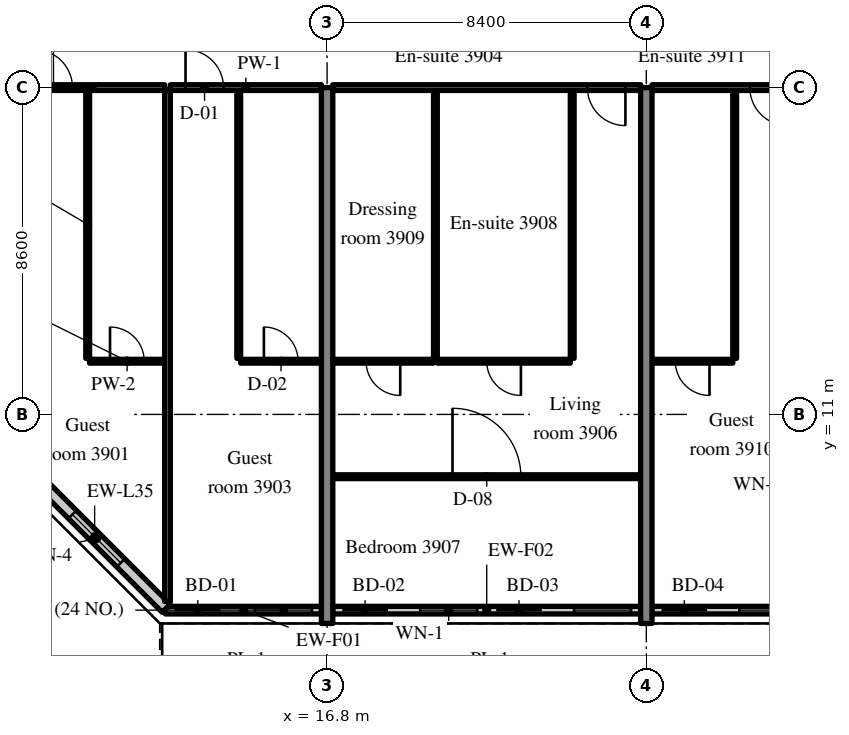
"""IFC4 building model, lengths in metres.
Left out: names, types, materials, properties, quantities, classifications, styles, units other than length and angle.
Written with IfcOpenShell. Run it as: python <this file> out.ifc"""

import sys

from ifc_helpers import new_model, si_unit, direction, frame, frame_2d, origin, place, context, subcontext, project, spatial, rectangle, extrude, source, transform, mapped, element, fill, save


model = new_model("IFC4")
c1 = context("Model", 3, precision=1e-05, world=origin(), true_north=direction((0.0, 1.0)))
c2 = subcontext(c1, "Body", "Model", "MODEL_VIEW")
j1 = project(units=[si_unit("LENGTHUNIT", "METRE"), si_unit("PLANEANGLEUNIT", "RADIAN")], contexts=[c1])
p1 = place(None, origin())
s1 = spatial("IfcSite", under=j1, at=p1, CompositionType="ELEMENT")
p2 = place(p1, origin())
s2 = spatial("IfcBuilding", under=s1, at=p2, CompositionType="ELEMENT")
p3 = place(p2, frame((0.0, 0.0, 163.0)))
s3 = spatial("IfcBuildingStorey", under=s2, at=p3, CompositionType="ELEMENT", Elevation=163.0)
m1 = source(origin(), c2, "Body", "SweptSolid", [
    extrude(rectangle(XDim=14.1, YDim=0.3, at=frame_2d((7.05, 0.0))), origin(), (0.0, 0.0, 1.0), 3.52),
])
for number, where, z_axis, x_axis in (
    (1, (16.8, 5.5, 0.0), (0.0, 0.0, 1.0), (0.0, 1.0, 0.0)),
    (2, (25.2, 5.5, 0.0), (0.0, 0.0, 1.0), (0.0, 1.0, 0.0)),
):
    element("IfcWall", number, at=place(p3, frame(where, z_axis=z_axis, x_axis=x_axis)), inside=s3, PredefinedType="SHEAR", context=c2, shape_type="MappedRepresentation", body=[
        mapped(m1, transform((0.0, 0.0, 0.0), scale=1.0)),
    ])
m2 = source(origin(), c2, "Body", "SweptSolid", [
    extrude(rectangle(XDim=4.105, YDim=0.2, at=frame_2d((2.052, 0.0))), origin(), (0.0, 0.0, 1.0), 2.87),
])
p4 = place(p3, frame((12.545, 5.85, 0.0), z_axis=(0.0, 0.0, 1.0), x_axis=(1.0, 0.0, 0.0)))
e3 = element("IfcWall", 3, at=p4, inside=s3, PredefinedType="SOLIDWALL", context=c2, shape_type="MappedRepresentation", body=[
    mapped(m2, transform((0.0, 0.0, 0.0), scale=1.0)),
])
m3 = source(origin(), c2, "Body", "SweptSolid", [
    extrude(rectangle(XDim=1.2, YDim=2.4, at=frame_2d((0.6, 1.2))), frame((0.0, 0.11, 0.0), z_axis=(0.0, -1.0, 0.0), x_axis=(1.0, 0.0, 0.0)), (0.0, 0.0, 1.0), 0.22),
])
p5 = place(p4, frame((0.25, 0.0, 0.0)))
e4 = element("IfcOpeningElement", 4, at=p5, cuts=e3, PredefinedType="OPENING", context=c2, shape_type="MappedRepresentation", body=[
    mapped(m3, transform((0.0, 0.0, 0.0), scale=1.0)),
])
m4 = source(origin(), c2, "Body", "SweptSolid", [
    extrude(rectangle(XDim=1.5, YDim=1.5, at=frame_2d((0.75, 0.75))), frame((0.0, 0.11, 0.0), z_axis=(0.0, -1.0, 0.0), x_axis=(1.0, 0.0, 0.0)), (0.0, 0.0, 1.0), 0.22),
])
p6 = place(p4, frame((2.355, 0.0, 0.9)))
e5 = element("IfcOpeningElement", 5, at=p6, cuts=e3, PredefinedType="OPENING", context=c2, shape_type="MappedRepresentation", body=[
    mapped(m4, transform((0.0, 0.0, 0.0), scale=1.0)),
])
m5 = source(origin(), c2, "Body", "SweptSolid", [
    extrude(rectangle(XDim=8.1, YDim=0.2, at=frame_2d((4.05, 0.0))), origin(), (0.0, 0.0, 1.0), 2.87),
])
p7 = place(p3, frame((16.95, 5.85, 0.0), z_axis=(0.0, 0.0, 1.0), x_axis=(1.0, 0.0, 0.0)))
e6 = element("IfcWall", 6, at=p7, inside=s3, PredefinedType="SOLIDWALL", context=c2, shape_type="MappedRepresentation", body=[
    mapped(m5, transform((0.0, 0.0, 0.0), scale=1.0)),
])
p8 = place(p7, frame((0.25, 0.0, 0.0)))
e7 = element("IfcOpeningElement", 7, at=p8, cuts=e6, PredefinedType="OPENING", context=c2, shape_type="MappedRepresentation", body=[
    mapped(m3, transform((0.0, 0.0, 0.0), scale=1.0)),
])
p9 = place(p7, frame((2.3, 0.0, 0.9)))
e8 = element("IfcOpeningElement", 8, at=p9, cuts=e6, PredefinedType="OPENING", context=c2, shape_type="MappedRepresentation", body=[
    mapped(m4, transform((0.0, 0.0, 0.0), scale=1.0)),
])
p10 = place(p7, frame((4.3, 0.0, 0.0)))
e9 = element("IfcOpeningElement", 9, at=p10, cuts=e6, PredefinedType="OPENING", context=c2, shape_type="MappedRepresentation", body=[
    mapped(m3, transform((0.0, 0.0, 0.0), scale=1.0)),
])
p11 = place(p7, frame((6.35, 0.0, 0.9)))
e10 = element("IfcOpeningElement", 10, at=p11, cuts=e6, PredefinedType="OPENING", context=c2, shape_type="MappedRepresentation", body=[
    mapped(m4, transform((0.0, 0.0, 0.0), scale=1.0)),
])
m6 = source(origin(), c2, "Body", "SweptSolid", [
    extrude(rectangle(XDim=8.1, YDim=0.2, at=frame_2d((4.05, 0.0))), origin(), (0.0, 0.0, 1.0), 2.87),
])
p12 = place(p3, frame((25.35, 5.85, 0.0), z_axis=(0.0, 0.0, 1.0), x_axis=(1.0, 0.0, 0.0)))
e11 = element("IfcWall", 11, at=p12, inside=s3, PredefinedType="SOLIDWALL", context=c2, shape_type="MappedRepresentation", body=[
    mapped(m6, transform((0.0, 0.0, 0.0), scale=1.0)),
])
p13 = place(p12, frame((0.25, 0.0, 0.0)))
e12 = element("IfcOpeningElement", 12, at=p13, cuts=e11, PredefinedType="OPENING", context=c2, shape_type="MappedRepresentation", body=[
    mapped(m3, transform((0.0, 0.0, 0.0), scale=1.0)),
])
p14 = place(p12, frame((2.3, 0.0, 0.9)))
e13 = element("IfcOpeningElement", 13, at=p14, cuts=e11, PredefinedType="OPENING", context=c2, shape_type="MappedRepresentation", body=[
    mapped(m4, transform((0.0, 0.0, 0.0), scale=1.0)),
])
p15 = place(p12, frame((4.3, 0.0, 0.0)))
e14 = element("IfcOpeningElement", 14, at=p15, cuts=e11, PredefinedType="OPENING", context=c2, shape_type="MappedRepresentation", body=[
    mapped(m3, transform((0.0, 0.0, 0.0), scale=1.0)),
])
p16 = place(p12, frame((6.35, 0.0, 0.9)))
e15 = element("IfcOpeningElement", 15, at=p16, cuts=e11, PredefinedType="OPENING", context=c2, shape_type="MappedRepresentation", body=[
    mapped(m4, transform((0.0, 0.0, 0.0), scale=1.0)),
])
m7 = source(origin(), c2, "Body", "SweptSolid", [
    extrude(rectangle(XDim=5.326, YDim=0.3, at=frame_2d((2.663, 0.0))), origin(), (0.0, 0.0, 1.0), 3.52),
])
p17 = place(p3, frame((8.8, 9.666, 0.0), z_axis=(0.0, 0.0, 1.0), x_axis=(0.707083859269, -0.707129702361, 0.0)))
e16 = element("IfcWall", 16, at=p17, inside=s3, PredefinedType="SOLIDWALL", context=c2, shape_type="MappedRepresentation", body=[
    mapped(m7, transform((0.0, 0.0, 0.0), scale=1.0)),
])
m8 = source(origin(), c2, "Body", "SweptSolid", [
    extrude(rectangle(XDim=1.8, YDim=1.5, at=frame_2d((0.9, 0.75))), frame((0.0, 0.16, 0.0), z_axis=(0.0, -1.0, 0.0), x_axis=(1.0, 0.0, 0.0)), (0.0, 0.0, 1.0), 0.32),
])
p18 = place(p17, frame((1.836, 0.0, 0.9)))
e17 = element("IfcOpeningElement", 17, at=p18, cuts=e16, PredefinedType="OPENING", context=c2, shape_type="MappedRepresentation", body=[
    mapped(m8, transform((0.0, 0.0, 0.0), scale=1.0)),
])
m9 = source(origin(), c2, "Body", "SweptSolid", [
    extrude(rectangle(XDim=7.05, YDim=0.1, at=frame_2d((3.525, 0.0))), origin(), (0.0, 0.0, 1.0), 3.52),
])
p19 = place(p3, frame((10.5, 12.475, 0.0), z_axis=(0.0, 0.0, 1.0), x_axis=(0.0, 1.0, 0.0)))
e18 = element("IfcWall", 18, at=p19, inside=s3, PredefinedType="PARTITIONING", context=c2, shape_type="MappedRepresentation", body=[
    mapped(m9, transform((0.0, 0.0, 0.0), scale=1.0)),
])
m10 = source(origin(), c2, "Body", "SweptSolid", [
    extrude(rectangle(XDim=1.975, YDim=0.1, at=frame_2d((0.987, 0.0))), origin(), (0.0, 0.0, 1.0), 3.52),
])
p20 = place(p3, frame((10.55, 12.4, 0.0), z_axis=(0.0, 0.0, 1.0), x_axis=(1.0, 0.0, 0.0)))
e19 = element("IfcWall", 19, at=p20, inside=s3, PredefinedType="PARTITIONING", context=c2, shape_type="MappedRepresentation", body=[
    mapped(m10, transform((0.0, 0.0, 0.0), scale=1.0)),
])
m11 = source(origin(), c2, "Body", "SweptSolid", [
    extrude(rectangle(XDim=0.9, YDim=2.1, at=frame_2d((0.45, 1.05))), frame((0.0, 0.06, 0.0), z_axis=(0.0, -1.0, 0.0), x_axis=(1.0, 0.0, 0.0)), (0.0, 0.0, 1.0), 0.12),
])
p21 = place(p20, frame((0.538, 0.0, 0.0)))
e20 = element("IfcOpeningElement", 20, at=p21, cuts=e19, PredefinedType="OPENING", context=c2, shape_type="MappedRepresentation", body=[
    mapped(m11, transform((0.0, 0.0, 0.0), scale=1.0)),
])
m12 = source(origin(), c2, "Body", "SweptSolid", [
    extrude(rectangle(XDim=3.825, YDim=0.15, at=frame_2d((1.913, 0.0))), origin(), (0.0, 0.0, 1.0), 2.82),
])
p22 = place(p3, frame((8.7, 19.6, 0.0), z_axis=(0.0, 0.0, 1.0), x_axis=(1.0, 0.0, 0.0)))
e21 = element("IfcWall", 21, at=p22, inside=s3, PredefinedType="PARTITIONING", context=c2, shape_type="MappedRepresentation", body=[
    mapped(m12, transform((0.0, 0.0, 0.0), scale=1.0)),
])
m13 = source(origin(), c2, "Body", "SweptSolid", [
    extrude(rectangle(XDim=1.0, YDim=2.1, at=frame_2d((0.5, 1.05))), frame((0.0, 0.085, 0.0), z_axis=(0.0, -1.0, 0.0), x_axis=(1.0, 0.0, 0.0)), (0.0, 0.0, 1.0), 0.17),
])
p23 = place(p22, frame((0.4, 0.0, 0.0)))
e22 = element("IfcOpeningElement", 22, at=p23, cuts=e21, PredefinedType="OPENING", context=c2, shape_type="MappedRepresentation", body=[
    mapped(m13, transform((0.0, 0.0, 0.0), scale=1.0)),
])
p24 = place(p3, frame((14.475, 12.475, 0.0), z_axis=(0.0, 0.0, 1.0), x_axis=(0.0, 1.0, 0.0)))
e23 = element("IfcWall", 23, at=p24, inside=s3, PredefinedType="PARTITIONING", context=c2, shape_type="MappedRepresentation", body=[
    mapped(m9, transform((0.0, 0.0, 0.0), scale=1.0)),
])
m14 = source(origin(), c2, "Body", "SweptSolid", [
    extrude(rectangle(XDim=2.125, YDim=0.1, at=frame_2d((1.062, 0.0))), origin(), (0.0, 0.0, 1.0), 3.52),
])
p25 = place(p3, frame((14.525, 12.4, 0.0), z_axis=(0.0, 0.0, 1.0), x_axis=(1.0, 0.0, 0.0)))
e24 = element("IfcWall", 24, at=p25, inside=s3, PredefinedType="PARTITIONING", context=c2, shape_type="MappedRepresentation", body=[
    mapped(m14, transform((0.0, 0.0, 0.0), scale=1.0)),
])
p26 = place(p25, frame((0.612, 0.0, 0.0)))
e25 = element("IfcOpeningElement", 25, at=p26, cuts=e24, PredefinedType="OPENING", context=c2, shape_type="MappedRepresentation", body=[
    mapped(m11, transform((0.0, 0.0, 0.0), scale=1.0)),
])
m15 = source(origin(), c2, "Body", "SweptSolid", [
    extrude(rectangle(XDim=3.975, YDim=0.15, at=frame_2d((1.987, 0.0))), origin(), (0.0, 0.0, 1.0), 2.82),
])
p27 = place(p3, frame((12.675, 19.6, 0.0), z_axis=(0.0, 0.0, 1.0), x_axis=(1.0, 0.0, 0.0)))
e26 = element("IfcWall", 26, at=p27, inside=s3, PredefinedType="PARTITIONING", context=c2, shape_type="MappedRepresentation", body=[
    mapped(m15, transform((0.0, 0.0, 0.0), scale=1.0)),
])
p28 = place(p27, frame((0.4, 0.0, 0.0)))
e27 = element("IfcOpeningElement", 27, at=p28, cuts=e26, PredefinedType="OPENING", context=c2, shape_type="MappedRepresentation", body=[
    mapped(m13, transform((0.0, 0.0, 0.0), scale=1.0)),
])
m16 = source(origin(), c2, "Body", "SweptSolid", [
    extrude(rectangle(XDim=13.447, YDim=0.15, at=frame_2d((6.724, 0.0))), origin(), (0.0, 0.0, 1.0), 3.52),
])
p29 = place(p3, frame((12.6, 6.078, 0.0), z_axis=(0.0, 0.0, 1.0), x_axis=(0.0, 1.0, 0.0)))
e28 = element("IfcWall", 28, at=p29, inside=s3, PredefinedType="PARTITIONING", context=c2, shape_type="MappedRepresentation", body=[
    mapped(m16, transform((0.0, 0.0, 0.0), scale=1.0)),
])
for number, where, z_axis, x_axis in (
    (29, (23.25, 12.475, 0.0), (0.0, 0.0, 1.0), (0.0, 1.0, 0.0)),
    (30, (19.65, 12.475, 0.0), (0.0, 0.0, 1.0), (0.0, 1.0, 0.0)),
):
    element("IfcWall", number, at=place(p3, frame(where, z_axis=z_axis, x_axis=x_axis)), inside=s3, PredefinedType="PARTITIONING", context=c2, shape_type="MappedRepresentation", body=[
        mapped(m9, transform((0.0, 0.0, 0.0), scale=1.0)),
    ])
m17 = source(origin(), c2, "Body", "SweptSolid", [
    extrude(rectangle(XDim=3.5, YDim=0.1, at=frame_2d((1.75, 0.0))), origin(), (0.0, 0.0, 1.0), 3.52),
])
p30 = place(p3, frame((19.7, 12.4, 0.0), z_axis=(0.0, 0.0, 1.0), x_axis=(1.0, 0.0, 0.0)))
e31 = element("IfcWall", 31, at=p30, inside=s3, PredefinedType="PARTITIONING", context=c2, shape_type="MappedRepresentation", body=[
    mapped(m17, transform((0.0, 0.0, 0.0), scale=1.0)),
])
p31 = place(p30, frame((1.3, 0.0, 0.0)))
e32 = element("IfcOpeningElement", 32, at=p31, cuts=e31, PredefinedType="OPENING", context=c2, shape_type="MappedRepresentation", body=[
    mapped(m11, transform((0.0, 0.0, 0.0), scale=1.0)),
])
m18 = source(origin(), c2, "Body", "SweptSolid", [
    extrude(rectangle(XDim=2.65, YDim=0.1, at=frame_2d((1.325, 0.0))), origin(), (0.0, 0.0, 1.0), 3.52),
])
p32 = place(p3, frame((16.95, 12.4, 0.0), z_axis=(0.0, 0.0, 1.0), x_axis=(1.0, 0.0, 0.0)))
e33 = element("IfcWall", 33, at=p32, inside=s3, PredefinedType="PARTITIONING", context=c2, shape_type="MappedRepresentation", body=[
    mapped(m18, transform((0.0, 0.0, 0.0), scale=1.0)),
])
p33 = place(p32, frame((0.875, 0.0, 0.0)))
e34 = element("IfcOpeningElement", 34, at=p33, cuts=e33, PredefinedType="OPENING", context=c2, shape_type="MappedRepresentation", body=[
    mapped(m11, transform((0.0, 0.0, 0.0), scale=1.0)),
])
m19 = source(origin(), c2, "Body", "SweptSolid", [
    extrude(rectangle(XDim=8.1, YDim=0.1, at=frame_2d((4.05, 0.0))), origin(), (0.0, 0.0, 1.0), 3.52),
])
p34 = place(p3, frame((16.95, 9.362, 0.0), z_axis=(0.0, 0.0, 1.0), x_axis=(1.0, 0.0, 0.0)))
e35 = element("IfcWall", 35, at=p34, inside=s3, PredefinedType="PARTITIONING", context=c2, shape_type="MappedRepresentation", body=[
    mapped(m19, transform((0.0, 0.0, 0.0), scale=1.0)),
])
m20 = source(origin(), c2, "Body", "SweptSolid", [
    extrude(rectangle(XDim=1.8, YDim=2.1, at=frame_2d((0.9, 1.05))), frame((0.0, 0.06, 0.0), z_axis=(0.0, -1.0, 0.0), x_axis=(1.0, 0.0, 0.0)), (0.0, 0.0, 1.0), 0.12),
])
p35 = place(p34, frame((3.15, 0.0, 0.0)))
e36 = element("IfcOpeningElement", 36, at=p35, cuts=e35, PredefinedType="OPENING", context=c2, shape_type="MappedRepresentation", body=[
    mapped(m20, transform((0.0, 0.0, 0.0), scale=1.0)),
])
m21 = source(origin(), c2, "Body", "SweptSolid", [
    extrude(rectangle(XDim=8.1, YDim=0.15, at=frame_2d((4.05, 0.0))), origin(), (0.0, 0.0, 1.0), 2.82),
])
p36 = place(p3, frame((16.95, 19.6, 0.0), z_axis=(0.0, 0.0, 1.0), x_axis=(1.0, 0.0, 0.0)))
e37 = element("IfcWall", 37, at=p36, inside=s3, PredefinedType="PARTITIONING", context=c2, shape_type="MappedRepresentation", body=[
    mapped(m21, transform((0.0, 0.0, 0.0), scale=1.0)),
])
p37 = place(p36, frame((6.7, 0.0, 0.0)))
e38 = element("IfcOpeningElement", 38, at=p37, cuts=e37, PredefinedType="OPENING", context=c2, shape_type="MappedRepresentation", body=[
    mapped(m13, transform((0.0, 0.0, 0.0), scale=1.0)),
])
p38 = place(p3, frame((27.525, 12.475, 0.0), z_axis=(0.0, 0.0, 1.0), x_axis=(0.0, 1.0, 0.0)))
e39 = element("IfcWall", 39, at=p38, inside=s3, PredefinedType="PARTITIONING", context=c2, shape_type="MappedRepresentation", body=[
    mapped(m9, transform((0.0, 0.0, 0.0), scale=1.0)),
])
p39 = place(p3, frame((25.35, 12.4, 0.0), z_axis=(0.0, 0.0, 1.0), x_axis=(1.0, 0.0, 0.0)))
e40 = element("IfcWall", 40, at=p39, inside=s3, PredefinedType="PARTITIONING", context=c2, shape_type="MappedRepresentation", body=[
    mapped(m14, transform((0.0, 0.0, 0.0), scale=1.0)),
])
p40 = place(p39, frame((0.613, 0.0, 0.0)))
e41 = element("IfcOpeningElement", 41, at=p40, cuts=e40, PredefinedType="OPENING", context=c2, shape_type="MappedRepresentation", body=[
    mapped(m11, transform((0.0, 0.0, 0.0), scale=1.0)),
])
p41 = place(p3, frame((25.35, 19.6, 0.0), z_axis=(0.0, 0.0, 1.0), x_axis=(1.0, 0.0, 0.0)))
e42 = element("IfcWall", 42, at=p41, inside=s3, PredefinedType="PARTITIONING", context=c2, shape_type="MappedRepresentation", body=[
    mapped(m15, transform((0.0, 0.0, 0.0), scale=1.0)),
])
p42 = place(p41, frame((2.575, 0.0, 0.0)))
e43 = element("IfcOpeningElement", 43, at=p42, cuts=e42, PredefinedType="OPENING", context=c2, shape_type="MappedRepresentation", body=[
    mapped(m13, transform((0.0, 0.0, 0.0), scale=1.0)),
])
m22 = source(origin(), c2, "Body", "SweptSolid", [
    extrude(rectangle(XDim=1.2, YDim=2.4, at=frame_2d((0.6, 1.2))), frame((0.0, 0.025, 0.0), z_axis=(0.0, -1.0, 0.0), x_axis=(1.0, 0.0, 0.0)), (0.0, 0.0, 1.0), 0.05),
])
p43 = place(p5, origin())
e44 = element("IfcDoor", 44, at=p43, inside=s3, OperationType="SLIDING_TO_LEFT", PredefinedType="DOOR", context=c2, shape_type="MappedRepresentation", body=[
    mapped(m22, transform((0.0, 0.0, 0.0), scale=1.0)),
])
fill(e4, e44)
m23 = source(origin(), c2, "Body", "SweptSolid", [
    extrude(rectangle(XDim=1.5, YDim=1.5, at=frame_2d((0.75, 0.75))), frame((0.0, 0.03, 0.0), z_axis=(0.0, -1.0, 0.0), x_axis=(1.0, 0.0, 0.0)), (0.0, 0.0, 1.0), 0.06),
])
p44 = place(p6, origin())
e45 = element("IfcWindow", 45, at=p44, inside=s3, PartitioningType="SINGLE_PANEL", PredefinedType="WINDOW", context=c2, shape_type="MappedRepresentation", body=[
    mapped(m23, transform((0.0, 0.0, 0.0), scale=1.0)),
])
fill(e5, e45)
p45 = place(p8, origin())
e46 = element("IfcDoor", 46, at=p45, inside=s3, OperationType="SLIDING_TO_RIGHT", PredefinedType="DOOR", context=c2, shape_type="MappedRepresentation", body=[
    mapped(m22, transform((0.0, 0.0, 0.0), scale=1.0)),
])
fill(e7, e46)
p46 = place(p9, origin())
e47 = element("IfcWindow", 47, at=p46, inside=s3, PartitioningType="SINGLE_PANEL", PredefinedType="WINDOW", context=c2, shape_type="MappedRepresentation", body=[
    mapped(m23, transform((0.0, 0.0, 0.0), scale=1.0)),
])
fill(e8, e47)
p47 = place(p10, origin())
e48 = element("IfcDoor", 48, at=p47, inside=s3, OperationType="SLIDING_TO_LEFT", PredefinedType="DOOR", context=c2, shape_type="MappedRepresentation", body=[
    mapped(m22, transform((0.0, 0.0, 0.0), scale=1.0)),
])
fill(e9, e48)
p48 = place(p11, origin())
e49 = element("IfcWindow", 49, at=p48, inside=s3, PartitioningType="SINGLE_PANEL", PredefinedType="WINDOW", context=c2, shape_type="MappedRepresentation", body=[
    mapped(m23, transform((0.0, 0.0, 0.0), scale=1.0)),
])
fill(e10, e49)
p49 = place(p13, origin())
e50 = element("IfcDoor", 50, at=p49, inside=s3, OperationType="SLIDING_TO_RIGHT", PredefinedType="DOOR", context=c2, shape_type="MappedRepresentation", body=[
    mapped(m22, transform((0.0, 0.0, 0.0), scale=1.0)),
])
fill(e12, e50)
p50 = place(p14, origin())
e51 = element("IfcWindow", 51, at=p50, inside=s3, PartitioningType="SINGLE_PANEL", PredefinedType="WINDOW", context=c2, shape_type="MappedRepresentation", body=[
    mapped(m23, transform((0.0, 0.0, 0.0), scale=1.0)),
])
fill(e13, e51)
m24 = source(origin(), c2, "Body", "SweptSolid", [
    extrude(rectangle(XDim=1.8, YDim=1.5, at=frame_2d((0.9, 0.75))), frame((0.0, 0.03, 0.0), z_axis=(0.0, -1.0, 0.0), x_axis=(1.0, 0.0, 0.0)), (0.0, 0.0, 1.0), 0.06),
])
p51 = place(p18, origin())
e52 = element("IfcWindow", 52, at=p51, inside=s3, PartitioningType="SINGLE_PANEL", PredefinedType="WINDOW", context=c2, shape_type="MappedRepresentation", body=[
    mapped(m24, transform((0.0, 0.0, 0.0), scale=1.0)),
])
fill(e17, e52)
m25 = source(origin(), c2, "Body", "SweptSolid", [
    extrude(rectangle(XDim=0.9, YDim=2.1, at=frame_2d((0.45, 1.05))), frame((0.0, 0.025, 0.0), z_axis=(0.0, -1.0, 0.0), x_axis=(1.0, 0.0, 0.0)), (0.0, 0.0, 1.0), 0.05),
])
p52 = place(p21, origin())
e53 = element("IfcDoor", 53, at=p52, inside=s3, OperationType="SINGLE_SWING_LEFT", PredefinedType="DOOR", context=c2, shape_type="MappedRepresentation", body=[
    mapped(m25, transform((0.0, 0.0, 0.0), scale=1.0)),
])
fill(e20, e53)
m26 = source(origin(), c2, "Body", "SweptSolid", [
    extrude(rectangle(XDim=1.0, YDim=2.1, at=frame_2d((0.5, 1.05))), frame((0.0, 0.025, 0.0), z_axis=(0.0, -1.0, 0.0), x_axis=(1.0, 0.0, 0.0)), (0.0, 0.0, 1.0), 0.05),
])
p53 = place(p23, origin())
e54 = element("IfcDoor", 54, at=p53, inside=s3, OperationType="SINGLE_SWING_LEFT", PredefinedType="DOOR", context=c2, shape_type="MappedRepresentation", body=[
    mapped(m26, transform((0.0, 0.0, 0.0), scale=1.0)),
])
fill(e22, e54)
p54 = place(p26, origin())
e55 = element("IfcDoor", 55, at=p54, inside=s3, OperationType="SINGLE_SWING_LEFT", PredefinedType="DOOR", context=c2, shape_type="MappedRepresentation", body=[
    mapped(m25, transform((0.0, 0.0, 0.0), scale=1.0)),
])
fill(e25, e55)
p55 = place(p28, origin())
e56 = element("IfcDoor", 56, at=p55, inside=s3, OperationType="SINGLE_SWING_LEFT", PredefinedType="DOOR", context=c2, shape_type="MappedRepresentation", body=[
    mapped(m26, transform((0.0, 0.0, 0.0), scale=1.0)),
])
fill(e27, e56)
p56 = place(p31, origin())
e57 = element("IfcDoor", 57, at=p56, inside=s3, OperationType="SINGLE_SWING_RIGHT", PredefinedType="DOOR", context=c2, shape_type="MappedRepresentation", body=[
    mapped(m25, transform((0.0, 0.0, 0.0), scale=1.0)),
])
fill(e32, e57)
p57 = place(p33, origin())
e58 = element("IfcDoor", 58, at=p57, inside=s3, OperationType="SINGLE_SWING_RIGHT", PredefinedType="DOOR", context=c2, shape_type="MappedRepresentation", body=[
    mapped(m25, transform((0.0, 0.0, 0.0), scale=1.0)),
])
fill(e34, e58)
m27 = source(origin(), c2, "Body", "SweptSolid", [
    extrude(rectangle(XDim=1.8, YDim=2.1, at=frame_2d((0.9, 1.05))), frame((0.0, 0.025, 0.0), z_axis=(0.0, -1.0, 0.0), x_axis=(1.0, 0.0, 0.0)), (0.0, 0.0, 1.0), 0.05),
])
p58 = place(p35, origin())
e59 = element("IfcDoor", 59, at=p58, inside=s3, OperationType="DOUBLE_DOOR_SINGLE_SWING", PredefinedType="DOOR", context=c2, shape_type="MappedRepresentation", body=[
    mapped(m27, transform((0.0, 0.0, 0.0), scale=1.0)),
])
fill(e36, e59)
p59 = place(p37, origin())
e60 = element("IfcDoor", 60, at=p59, inside=s3, OperationType="SINGLE_SWING_RIGHT", PredefinedType="DOOR", context=c2, shape_type="MappedRepresentation", body=[
    mapped(m26, transform((0.0, 0.0, 0.0), scale=1.0)),
])
fill(e38, e60)
p60 = place(p40, origin())
e61 = element("IfcDoor", 61, at=p60, inside=s3, OperationType="SINGLE_SWING_RIGHT", PredefinedType="DOOR", context=c2, shape_type="MappedRepresentation", body=[
    mapped(m25, transform((0.0, 0.0, 0.0), scale=1.0)),
])
fill(e41, e61)
p61 = place(p42, origin())
e62 = element("IfcDoor", 62, at=p61, inside=s3, OperationType="SINGLE_SWING_RIGHT", PredefinedType="DOOR", context=c2, shape_type="MappedRepresentation", body=[
    mapped(m26, transform((0.0, 0.0, 0.0), scale=1.0)),
])
fill(e43, e62)
save(model, sys.argv[1])
